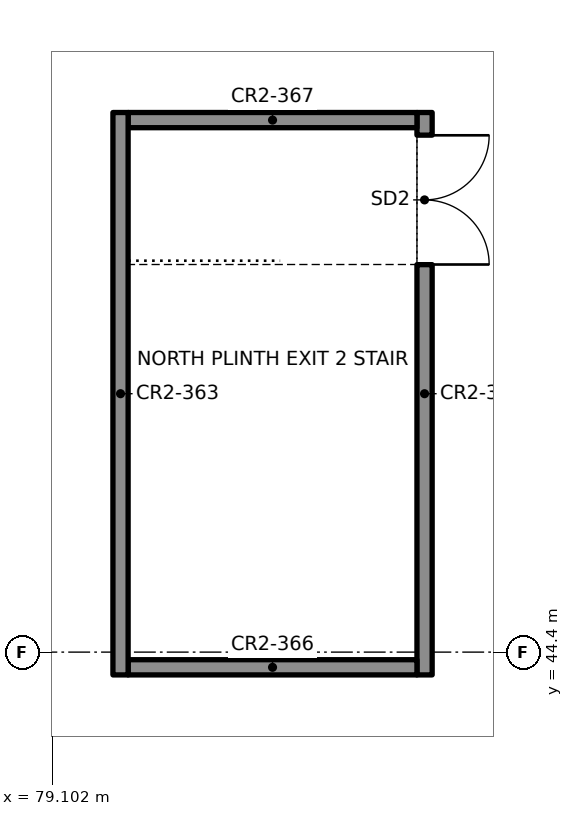
"""IFC4 building model, lengths in metres.
Left out: names, types, materials, properties, quantities, classifications, styles, units other than length and angle.
Written with IfcOpenShell. Run it as: python <this file> out.ifc"""

import sys

from ifc_helpers import new_model, si_unit, direction, frame, frame_2d, origin, place, context, subcontext, project, spatial, rectangle, extrude, element, fill, save


model = new_model("IFC4")
c1 = context("Model", 3, precision=1e-05, world=origin(), true_north=direction((0.0, 1.0)))
c2 = subcontext(c1, "Body", "Model", "MODEL_VIEW")
j1 = project(units=[si_unit("LENGTHUNIT", "METRE"), si_unit("PLANEANGLEUNIT", "RADIAN")], contexts=[c1])
p1 = place(None, origin())
s1 = spatial("IfcSite", under=j1, at=p1, CompositionType="ELEMENT")
p2 = place(p1, origin())
s2 = spatial("IfcBuilding", under=s1, at=p2, CompositionType="ELEMENT")
p3 = place(p2, frame((0.0, 0.0, 4.4)))
s3 = spatial("IfcBuildingStorey", under=s2, at=p3, CompositionType="ELEMENT", Elevation=4.4)
p4 = place(p3, frame((80.0, 44.1, 0.0), z_axis=(0.0, 0.0, 1.0), x_axis=(0.0, 1.0, 0.0)))
e1 = element("IfcWall", 1, at=p4, inside=s3, PredefinedType="SOLIDWALL", context=c2, shape_type="SweptSolid", body=[
    extrude(rectangle(XDim=7.4, YDim=0.2, at=frame_2d((3.7, 0.0))), origin(), (0.0, 0.0, 1.0), 3.0),
])
p5 = place(p3, frame((84.0, 44.1, 0.0), z_axis=(0.0, 0.0, 1.0), x_axis=(0.0, 1.0, 0.0)))
e2 = element("IfcWall", 2, at=p5, inside=s3, PredefinedType="SOLIDWALL", context=c2, shape_type="SweptSolid", body=[
    extrude(rectangle(XDim=7.4, YDim=0.2, at=frame_2d((3.7, 0.0))), origin(), (0.0, 0.0, 1.0), 3.0),
])
p6 = place(p5, frame((5.4, 0.0, 0.0)))
e3 = element("IfcOpeningElement", 3, at=p6, cuts=e2, PredefinedType="OPENING", context=c2, shape_type="SweptSolid", body=[
    extrude(rectangle(XDim=1.7, YDim=2.1, at=frame_2d((0.85, 1.05))), frame((0.0, 0.11, 0.0), z_axis=(0.0, -1.0, 0.0), x_axis=(1.0, 0.0, 0.0)), (0.0, 0.0, 1.0), 0.22),
])
for number, where, z_axis, x_axis in (
    (4, (80.1, 44.2, 0.0), (0.0, 0.0, 1.0), (1.0, 0.0, 0.0)),
    (5, (80.1, 51.4, 0.0), (0.0, 0.0, 1.0), (1.0, 0.0, 0.0)),
):
    element("IfcWall", number, at=place(p3, frame(where, z_axis=z_axis, x_axis=x_axis)), inside=s3, PredefinedType="SOLIDWALL", context=c2, shape_type="SweptSolid", body=[
        extrude(rectangle(XDim=3.8, YDim=0.2, at=frame_2d((1.9, 0.0))), origin(), (0.0, 0.0, 1.0), 3.0),
    ])
p7 = place(p6, origin())
e6 = element("IfcDoor", 6, at=p7, inside=s3, OperationType="DOUBLE_DOOR_SINGLE_SWING", PredefinedType="DOOR", context=c2, shape_type="SweptSolid", body=[
    extrude(rectangle(XDim=1.7, YDim=2.1, at=frame_2d((0.85, 1.05))), frame((0.0, 0.025, 0.0), z_axis=(0.0, -1.0, 0.0), x_axis=(1.0, 0.0, 0.0)), (0.0, 0.0, 1.0), 0.05),
])
fill(e3, e6)
save(model, sys.argv[1])
